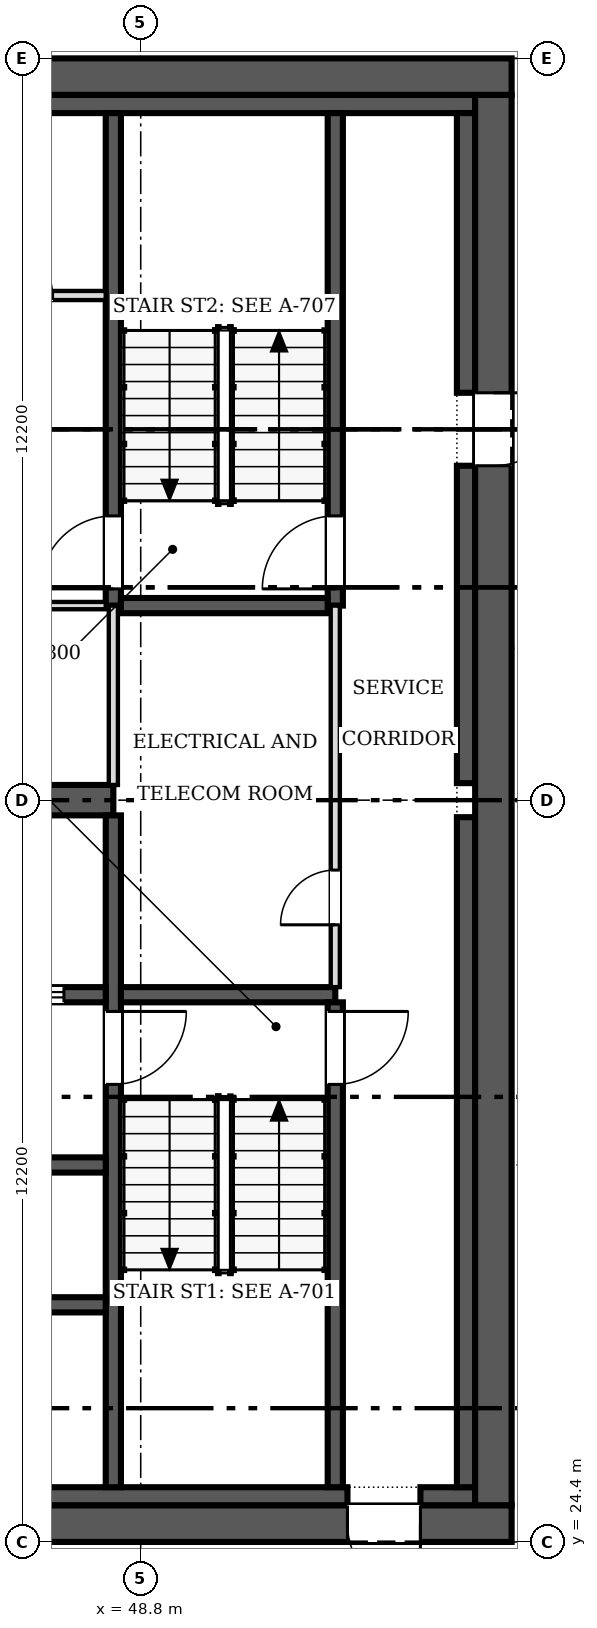
"""IFC4 building model, lengths in metres.
Left out: names, types, materials, properties, quantities, classifications, styles, units other than length and angle.
Written with IfcOpenShell. Run it as: python <this file> out.ifc"""

import sys

from ifc_helpers import new_model, si_unit, direction, frame, frame_2d, origin, place, context, subcontext, project, spatial, rectangle, extrude, source, transform, mapped, element, fill, save


model = new_model("IFC4")
c1 = context("Model", 3, precision=1e-05, world=origin(), true_north=direction((0.0, 1.0)))
c2 = subcontext(c1, "Body", "Model", "MODEL_VIEW")
j1 = project(units=[si_unit("LENGTHUNIT", "METRE"), si_unit("PLANEANGLEUNIT", "RADIAN")], contexts=[c1])
p1 = place(None, origin())
s1 = spatial("IfcSite", under=j1, at=p1, CompositionType="ELEMENT")
p2 = place(p1, origin())
s2 = spatial("IfcBuilding", under=s1, at=p2, CompositionType="ELEMENT")
p3 = place(p2, frame((0.0, 0.0, 166.8)))
s3 = spatial("IfcBuildingStorey", under=s2, at=p3, CompositionType="ELEMENT", Elevation=166.8)
p4 = place(p3, frame((54.9, 24.7, 0.0), z_axis=(0.0, 0.0, 1.0), x_axis=(-1.0, 0.0, 0.0)))
e1 = element("IfcWall", 1, at=p4, inside=s3, PredefinedType="SHEAR", context=c2, shape_type="SweptSolid", body=[
    extrude(rectangle(XDim=24.4, YDim=0.6, at=frame_2d((12.2, 0.0))), origin(), (0.0, 0.0, 1.0), 3.8),
])
m1 = source(origin(), c2, "Body", "SweptSolid", [
    extrude(rectangle(XDim=1.2, YDim=2.1, at=frame_2d((0.6, 1.05))), frame((0.0, 0.31, 0.0), z_axis=(0.0, -1.0, 0.0), x_axis=(1.0, 0.0, 0.0)), (0.0, 0.0, 1.0), 0.62),
])
p5 = place(p4, frame((1.5, 0.0, 0.0)))
e2 = element("IfcOpeningElement", 2, at=p5, cuts=e1, PredefinedType="OPENING", context=c2, shape_type="MappedRepresentation", body=[
    mapped(m1, transform((0.0, 0.0, 0.0), scale=1.0)),
])
p6 = place(p3, frame((30.5, 48.5, 0.0), z_axis=(0.0, 0.0, 1.0), x_axis=(1.0, 0.0, 0.0)))
e3 = element("IfcWall", 3, at=p6, inside=s3, PredefinedType="SHEAR", context=c2, shape_type="SweptSolid", body=[
    extrude(rectangle(XDim=24.4, YDim=0.6, at=frame_2d((12.2, 0.0))), origin(), (0.0, 0.0, 1.0), 3.8),
])
p7 = place(p3, frame((54.6, 48.2, 0.0), z_axis=(0.0, 0.0, 1.0), x_axis=(0.0, -1.0, 0.0)))
e4 = element("IfcWall", 4, at=p7, inside=s3, PredefinedType="SHEAR", context=c2, shape_type="SweptSolid", body=[
    extrude(rectangle(XDim=23.2, YDim=0.6, at=frame_2d((11.6, 0.0))), origin(), (0.0, 0.0, 1.0), 3.8),
])
p8 = place(p7, frame((4.9, 0.0, 0.0)))
e5 = element("IfcOpeningElement", 5, at=p8, cuts=e4, PredefinedType="OPENING", context=c2, shape_type="MappedRepresentation", body=[
    mapped(m1, transform((0.0, 0.0, 0.0), scale=1.0)),
])
p9 = place(p3, frame((31.1, 25.15, 0.0), z_axis=(0.0, 0.0, 1.0), x_axis=(1.0, 0.0, 0.0)))
e6 = element("IfcWall", 6, at=p9, inside=s3, PredefinedType="SOLIDWALL", context=c2, shape_type="SweptSolid", body=[
    extrude(rectangle(XDim=21.1, YDim=0.3, at=frame_2d((10.55, 0.0))), origin(), (0.0, 0.0, 1.0), 3.8),
])
p10 = place(p3, frame((53.4, 25.15, 0.0), z_axis=(0.0, 0.0, 1.0), x_axis=(1.0, 0.0, 0.0)))
e7 = element("IfcWall", 7, at=p10, inside=s3, PredefinedType="SOLIDWALL", context=c2, shape_type="SweptSolid", body=[
    extrude(rectangle(XDim=0.9, YDim=0.3, at=frame_2d((0.45, 0.0))), origin(), (0.0, 0.0, 1.0), 3.8),
])
p11 = place(p3, frame((31.1, 48.05, 0.0), z_axis=(0.0, 0.0, 1.0), x_axis=(1.0, 0.0, 0.0)))
e8 = element("IfcWall", 8, at=p11, inside=s3, PredefinedType="SOLIDWALL", context=c2, shape_type="SweptSolid", body=[
    extrude(rectangle(XDim=23.2, YDim=0.3, at=frame_2d((11.6, 0.0))), origin(), (0.0, 0.0, 1.0), 3.8),
])
p12 = place(p3, frame((54.15, 25.3, 0.0), z_axis=(0.0, 0.0, 1.0), x_axis=(0.0, 1.0, 0.0)))
e9 = element("IfcWall", 9, at=p12, inside=s3, PredefinedType="SOLIDWALL", context=c2, shape_type="SweptSolid", body=[
    extrude(rectangle(XDim=11.02, YDim=0.3, at=frame_2d((5.51, 0.0))), origin(), (0.0, 0.0, 1.0), 3.8),
])
p13 = place(p3, frame((54.15, 36.88, 0.0), z_axis=(0.0, 0.0, 1.0), x_axis=(0.0, 1.0, 0.0)))
e10 = element("IfcWall", 10, at=p13, inside=s3, PredefinedType="SOLIDWALL", context=c2, shape_type="SweptSolid", body=[
    extrude(rectangle(XDim=5.22, YDim=0.3, at=frame_2d((2.61, 0.0))), origin(), (0.0, 0.0, 1.0), 3.8),
])
p14 = place(p3, frame((54.15, 43.3, 0.0), z_axis=(0.0, 0.0, 1.0), x_axis=(0.0, 1.0, 0.0)))
e11 = element("IfcWall", 11, at=p14, inside=s3, PredefinedType="SOLIDWALL", context=c2, shape_type="SweptSolid", body=[
    extrude(rectangle(XDim=4.6, YDim=0.3, at=frame_2d((2.3, 0.0))), origin(), (0.0, 0.0, 1.0), 3.8),
])
p15 = place(p3, frame((31.4, 36.6, 0.0), z_axis=(0.0, 0.0, 1.0), x_axis=(1.0, 0.0, 0.0)))
e12 = element("IfcWall", 12, at=p15, inside=s3, PredefinedType="SHEAR", context=c2, shape_type="SweptSolid", body=[
    extrude(rectangle(XDim=16.95, YDim=0.5, at=frame_2d((8.475, 0.0))), origin(), (0.0, 0.0, 1.0), 3.8),
])
p16 = place(p3, frame((48.35, 36.35, 0.0), z_axis=(0.0, 0.0, 1.0), x_axis=(0.0, -1.0, 0.0)))
e13 = element("IfcWall", 13, at=p16, inside=s3, PredefinedType="SOLIDWALL", context=c2, shape_type="SweptSolid", body=[
    extrude(rectangle(XDim=11.05, YDim=0.25, at=frame_2d((5.525, 0.0))), origin(), (0.0, 0.0, 1.0), 3.8),
])
m2 = source(origin(), c2, "Body", "SweptSolid", [
    extrude(rectangle(XDim=1.2, YDim=2.1, at=frame_2d((0.6, 1.05))), frame((0.0, 0.135, 0.0), z_axis=(0.0, -1.0, 0.0), x_axis=(1.0, 0.0, 0.0)), (0.0, 0.0, 1.0), 0.27),
])
p17 = place(p16, frame((3.225, 0.0, 0.0)))
e14 = element("IfcOpeningElement", 14, at=p17, cuts=e13, PredefinedType="OPENING", context=c2, shape_type="MappedRepresentation", body=[
    mapped(m2, transform((0.0, 0.0, 0.0), scale=1.0)),
])
p18 = place(p3, frame((48.225, 33.4, 0.0), z_axis=(0.0, 0.0, 1.0), x_axis=(-1.0, 0.0, 0.0)))
e15 = element("IfcWall", 15, at=p18, inside=s3, PredefinedType="SOLIDWALL", context=c2, shape_type="SweptSolid", body=[
    extrude(rectangle(XDim=5.275, YDim=0.25, at=frame_2d((2.638, 0.0))), origin(), (0.0, 0.0, 1.0), 3.8),
])
p19 = place(p18, frame((3.512, 0.0, 0.0)))
e16 = element("IfcOpeningElement", 16, at=p19, cuts=e15, PredefinedType="OPENING", context=c2, shape_type="MappedRepresentation", body=[
    mapped(m2, transform((0.0, 0.0, 0.0), scale=1.0)),
])
p20 = place(p18, frame((0.688, 0.0, 0.0)))
e17 = element("IfcOpeningElement", 17, at=p20, cuts=e15, PredefinedType="OPENING", context=c2, shape_type="MappedRepresentation", body=[
    mapped(m2, transform((0.0, 0.0, 0.0), scale=1.0)),
])
p21 = place(p3, frame((48.475, 33.4, 0.0), z_axis=(0.0, 0.0, 1.0), x_axis=(1.0, 0.0, 0.0)))
e18 = element("IfcWall", 18, at=p21, inside=s3, PredefinedType="SOLIDWALL", context=c2, shape_type="SweptSolid", body=[
    extrude(rectangle(XDim=3.525, YDim=0.25, at=frame_2d((1.762, 0.0))), origin(), (0.0, 0.0, 1.0), 3.8),
])
p22 = place(p3, frame((48.35, 47.9, 0.0), z_axis=(0.0, 0.0, 1.0), x_axis=(0.0, -1.0, 0.0)))
e19 = element("IfcWall", 19, at=p22, inside=s3, PredefinedType="SOLIDWALL", context=c2, shape_type="SweptSolid", body=[
    extrude(rectangle(XDim=8.1, YDim=0.25, at=frame_2d((4.05, 0.0))), origin(), (0.0, 0.0, 1.0), 3.8),
])
p23 = place(p22, frame((6.625, 0.0, 0.0)))
e20 = element("IfcOpeningElement", 20, at=p23, cuts=e19, PredefinedType="OPENING", context=c2, shape_type="MappedRepresentation", body=[
    mapped(m2, transform((0.0, 0.0, 0.0), scale=1.0)),
])
p24 = place(p3, frame((52.0, 25.3, 0.0), z_axis=(0.0, 0.0, 1.0), x_axis=(0.0, 1.0, 0.0)))
e21 = element("IfcWall", 21, at=p24, inside=s3, PredefinedType="SOLIDWALL", context=c2, shape_type="SweptSolid", body=[
    extrude(rectangle(XDim=7.975, YDim=0.25, at=frame_2d((3.987, 0.0))), origin(), (0.0, 0.0, 1.0), 3.8),
])
p25 = place(p24, frame((6.625, 0.0, 0.0)))
e22 = element("IfcOpeningElement", 22, at=p25, cuts=e21, PredefinedType="OPENING", context=c2, shape_type="MappedRepresentation", body=[
    mapped(m2, transform((0.0, 0.0, 0.0), scale=1.0)),
])
p26 = place(p3, frame((52.0, 39.8, 0.0), z_axis=(0.0, 0.0, 1.0), x_axis=(0.0, 1.0, 0.0)))
e23 = element("IfcWall", 23, at=p26, inside=s3, PredefinedType="SOLIDWALL", context=c2, shape_type="SweptSolid", body=[
    extrude(rectangle(XDim=8.1, YDim=0.25, at=frame_2d((4.05, 0.0))), origin(), (0.0, 0.0, 1.0), 3.8),
])
p27 = place(p26, frame((0.275, 0.0, 0.0)))
e24 = element("IfcOpeningElement", 24, at=p27, cuts=e23, PredefinedType="OPENING", context=c2, shape_type="MappedRepresentation", body=[
    mapped(m2, transform((0.0, 0.0, 0.0), scale=1.0)),
])
for number, where, z_axis, x_axis in (
    (25, (42.95, 28.3, 0.0), (0.0, 0.0, 1.0), (1.0, 0.0, 0.0)),
    (26, (42.95, 30.6, 0.0), (0.0, 0.0, 1.0), (1.0, 0.0, 0.0)),
):
    element("IfcWall", number, at=place(p3, frame(where, z_axis=z_axis, x_axis=x_axis)), inside=s3, PredefinedType="SOLIDWALL", context=c2, shape_type="SweptSolid", body=[
        extrude(rectangle(XDim=5.275, YDim=0.25, at=frame_2d((2.638, 0.0))), origin(), (0.0, 0.0, 1.0), 3.8),
    ])
p28 = place(p3, frame((48.475, 39.8, 0.0), z_axis=(0.0, 0.0, 1.0), x_axis=(1.0, 0.0, 0.0)))
e27 = element("IfcWall", 27, at=p28, inside=s3, PredefinedType="SOLIDWALL", context=c2, shape_type="SweptSolid", body=[
    extrude(rectangle(XDim=3.4, YDim=0.25, at=frame_2d((1.7, 0.0))), origin(), (0.0, 0.0, 1.0), 3.8),
])
p29 = place(p3, frame((52.0, 33.525, 0.0), z_axis=(0.0, 0.0, 1.0), x_axis=(0.0, 1.0, 0.0)))
e28 = element("IfcWall", 28, at=p29, inside=s3, PredefinedType="PARTITIONING", context=c2, shape_type="SweptSolid", body=[
    extrude(rectangle(XDim=6.275, YDim=0.15, at=frame_2d((3.138, 0.0))), origin(), (0.0, 0.0, 1.0), 3.6),
])
m3 = source(origin(), c2, "Body", "SweptSolid", [
    extrude(rectangle(XDim=0.9, YDim=2.1, at=frame_2d((0.45, 1.05))), frame((0.0, 0.085, 0.0), z_axis=(0.0, -1.0, 0.0), x_axis=(1.0, 0.0, 0.0)), (0.0, 0.0, 1.0), 0.17),
])
p30 = place(p29, frame((1.025, 0.0, 0.0)))
e29 = element("IfcOpeningElement", 29, at=p30, cuts=e28, PredefinedType="OPENING", context=c2, shape_type="MappedRepresentation", body=[
    mapped(m3, transform((0.0, 0.0, 0.0), scale=1.0)),
])
p31 = place(p3, frame((48.225, 39.8, 0.0), z_axis=(0.0, 0.0, 1.0), x_axis=(-1.0, 0.0, 0.0)))
e30 = element("IfcWall", 30, at=p31, inside=s3, PredefinedType="PARTITIONING", context=c2, shape_type="SweptSolid", body=[
    extrude(rectangle(XDim=5.275, YDim=0.12, at=frame_2d((2.638, 0.0))), origin(), (0.0, 0.0, 1.0), 3.6),
])
m4 = source(origin(), c2, "Body", "SweptSolid", [
    extrude(rectangle(XDim=0.9, YDim=2.1, at=frame_2d((0.45, 1.05))), frame((0.0, 0.07, 0.0), z_axis=(0.0, -1.0, 0.0), x_axis=(1.0, 0.0, 0.0)), (0.0, 0.0, 1.0), 0.14),
])
p32 = place(p31, frame((2.25, 0.0, 0.0)))
e31 = element("IfcOpeningElement", 31, at=p32, cuts=e30, PredefinedType="OPENING", context=c2, shape_type="MappedRepresentation", body=[
    mapped(m4, transform((0.0, 0.0, 0.0), scale=1.0)),
])
p33 = place(p3, frame((48.35, 36.85, 0.0), z_axis=(0.0, 0.0, 1.0), x_axis=(0.0, 1.0, 0.0)))
e32 = element("IfcWall", 32, at=p33, inside=s3, PredefinedType="PARTITIONING", context=c2, shape_type="SweptSolid", body=[
    extrude(rectangle(XDim=2.95, YDim=0.15, at=frame_2d((1.475, 0.0))), origin(), (0.0, 0.0, 1.0), 3.6),
])
p34 = place(p3, frame((45.6, 44.9, 0.0), z_axis=(0.0, 0.0, 1.0), x_axis=(1.0, 0.0, 0.0)))
e33 = element("IfcWall", 33, at=p34, inside=s3, PredefinedType="PARTITIONING", context=c2, shape_type="SweptSolid", body=[
    extrude(rectangle(XDim=2.625, YDim=0.15, at=frame_2d((1.312, 0.0))), origin(), (0.0, 0.0, 1.0), 3.6),
])
p35 = place(p34, frame((0.85, 0.0, 0.0)))
e34 = element("IfcOpeningElement", 34, at=p35, cuts=e33, PredefinedType="OPENING", context=c2, shape_type="MappedRepresentation", body=[
    mapped(m3, transform((0.0, 0.0, 0.0), scale=1.0)),
])
m5 = source(origin(), c2, "Body", "SweptSolid", [
    extrude(rectangle(XDim=1.2, YDim=2.1, at=frame_2d((0.6, 1.05))), frame((0.0, 0.025, 0.0), z_axis=(0.0, -1.0, 0.0), x_axis=(1.0, 0.0, 0.0)), (0.0, 0.0, 1.0), 0.05),
])
p36 = place(p5, origin())
e35 = element("IfcDoor", 35, at=p36, inside=s3, OperationType="SINGLE_SWING_LEFT", PredefinedType="DOOR", context=c2, shape_type="MappedRepresentation", body=[
    mapped(m5, transform((0.0, 0.0, 0.0), scale=1.0)),
])
fill(e2, e35)
p37 = place(p8, origin())
e36 = element("IfcDoor", 36, at=p37, inside=s3, OperationType="SINGLE_SWING_LEFT", PredefinedType="DOOR", context=c2, shape_type="MappedRepresentation", body=[
    mapped(m5, transform((0.0, 0.0, 0.0), scale=1.0)),
])
fill(e5, e36)
p38 = place(p17, origin())
e37 = element("IfcDoor", 37, at=p38, inside=s3, OperationType="SINGLE_SWING_LEFT", PredefinedType="DOOR", context=c2, shape_type="MappedRepresentation", body=[
    mapped(m5, transform((0.0, 0.0, 0.0), scale=1.0)),
])
fill(e14, e37)
p39 = place(p20, origin())
e38 = element("IfcDoor", 38, at=p39, inside=s3, OperationType="DOUBLE_DOOR_SLIDING", PredefinedType="DOOR", context=c2, shape_type="MappedRepresentation", body=[
    mapped(m5, transform((0.0, 0.0, 0.0), scale=1.0)),
])
fill(e17, e38)
p40 = place(p23, origin())
e39 = element("IfcDoor", 39, at=p40, inside=s3, OperationType="SINGLE_SWING_RIGHT", PredefinedType="DOOR", context=c2, shape_type="MappedRepresentation", body=[
    mapped(m5, transform((0.0, 0.0, 0.0), scale=1.0)),
])
fill(e20, e39)
p41 = place(p25, origin())
e40 = element("IfcDoor", 40, at=p41, inside=s3, OperationType="SINGLE_SWING_RIGHT", PredefinedType="DOOR", context=c2, shape_type="MappedRepresentation", body=[
    mapped(m5, transform((0.0, 0.0, 0.0), scale=1.0)),
])
fill(e22, e40)
p42 = place(p27, origin())
e41 = element("IfcDoor", 41, at=p42, inside=s3, OperationType="SINGLE_SWING_LEFT", PredefinedType="DOOR", context=c2, shape_type="MappedRepresentation", body=[
    mapped(m5, transform((0.0, 0.0, 0.0), scale=1.0)),
])
fill(e24, e41)
m6 = source(origin(), c2, "Body", "SweptSolid", [
    extrude(rectangle(XDim=0.9, YDim=2.1, at=frame_2d((0.45, 1.05))), frame((0.0, 0.025, 0.0), z_axis=(0.0, -1.0, 0.0), x_axis=(1.0, 0.0, 0.0)), (0.0, 0.0, 1.0), 0.05),
])
p43 = place(p30, origin())
e42 = element("IfcDoor", 42, at=p43, inside=s3, OperationType="SINGLE_SWING_LEFT", PredefinedType="DOOR", context=c2, shape_type="MappedRepresentation", body=[
    mapped(m6, transform((0.0, 0.0, 0.0), scale=1.0)),
])
fill(e29, e42)
save(model, sys.argv[1])
